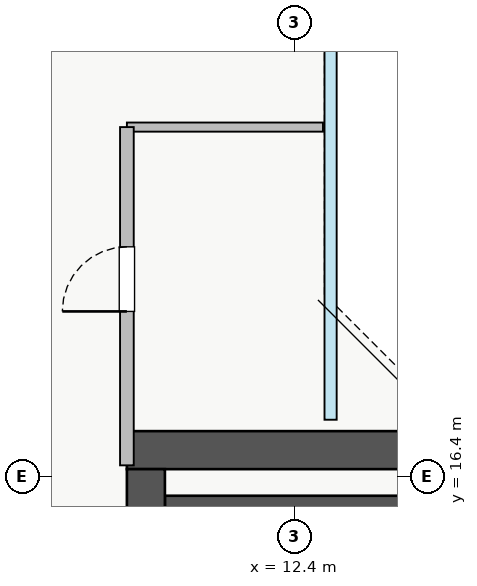
"""IFC4 building model, lengths in metres.
Left out: names, types, materials, properties, quantities, classifications, styles, units other than length and angle.
Written with IfcOpenShell. Run it as: python <this file> out.ifc"""

import sys

from ifc_helpers import new_model, si_unit, direction, frame, frame_2d, origin, place, context, subcontext, project, spatial, rectangle, extrude, source, transform, mapped, element, fill, save


model = new_model("IFC4")
c1 = context("Model", 3, precision=1e-05, world=origin(), true_north=direction((0.0, 1.0)))
c2 = subcontext(c1, "Body", "Model", "MODEL_VIEW")
j1 = project(units=[si_unit("LENGTHUNIT", "METRE"), si_unit("PLANEANGLEUNIT", "RADIAN")], contexts=[c1])
p1 = place(None, origin())
s1 = spatial("IfcSite", under=j1, at=p1, CompositionType="ELEMENT")
p2 = place(p1, origin())
s2 = spatial("IfcBuilding", under=s1, at=p2, CompositionType="ELEMENT")
p3 = place(p2, frame((0.0, 0.0, 210.0)))
s3 = spatial("IfcBuildingStorey", under=s2, at=p3, CompositionType="ELEMENT", Elevation=210.0)
p4 = place(p3, frame((10.7, 16.05, 0.0), z_axis=(0.0, 0.0, 1.0), x_axis=(1.0, 0.0, 0.0)))
e1 = element("IfcWall", 1, at=p4, inside=s3, PredefinedType="SHEAR", context=c2, shape_type="SweptSolid", body=[
    extrude(rectangle(XDim=7.45, YDim=0.2, at=frame_2d((3.725, 0.0))), origin(), (0.0, 0.0, 1.0), 3.25),
])
p5 = place(p3, frame((10.2, 16.75, 0.0), z_axis=(0.0, 0.0, 1.0), x_axis=(1.0, 0.0, 0.0)))
e2 = element("IfcWall", 2, at=p5, inside=s3, PredefinedType="SHEAR", context=c2, shape_type="SweptSolid", body=[
    extrude(rectangle(XDim=17.6, YDim=0.5, at=frame_2d((8.8, 0.0))), origin(), (0.0, 0.0, 1.0), 3.25),
])
p6 = place(p3, frame((10.45, 10.3, 0.0), z_axis=(0.0, 0.0, 1.0), x_axis=(0.0, 1.0, 0.0)))
e3 = element("IfcWall", 3, at=p6, inside=s3, PredefinedType="SHEAR", context=c2, shape_type="SweptSolid", body=[
    extrude(rectangle(XDim=6.2, YDim=0.5, at=frame_2d((3.1, 0.0))), origin(), (0.0, 0.0, 1.0), 3.25),
])
p7 = place(p3, frame((10.2, 21.0, 0.0), z_axis=(0.0, 0.0, 1.0), x_axis=(1.0, 0.0, 0.0)))
e4 = element("IfcWall", 4, at=p7, inside=s3, PredefinedType="PLUMBINGWALL", context=c2, shape_type="SweptSolid", body=[
    extrude(rectangle(XDim=2.58, YDim=0.12, at=frame_2d((1.29, 0.0))), origin(), (0.0, 0.0, 1.0), 3.07),
])
p8 = place(p3, frame((10.2, 16.55, 0.0), z_axis=(0.0, 0.0, 1.0), x_axis=(0.0, 1.0, 0.0)))
e5 = element("IfcWall", 5, at=p8, inside=s3, PredefinedType="PARTITIONING", context=c2, shape_type="SweptSolid", body=[
    extrude(rectangle(XDim=4.45, YDim=0.18, at=frame_2d((2.225, 0.0))), origin(), (0.0, 0.0, 1.0), 3.07),
])
p9 = place(p8, frame((2.025, 0.0, 0.0)))
e6 = element("IfcOpeningElement", 6, at=p9, cuts=e5, PredefinedType="OPENING", context=c2, shape_type="SweptSolid", body=[
    extrude(rectangle(XDim=0.85, YDim=2.05, at=frame_2d((0.425, 1.025))), frame((0.0, 0.1, 0.0), z_axis=(0.0, -1.0, 0.0), x_axis=(1.0, 0.0, 0.0)), (0.0, 0.0, 1.0), 0.2),
])
m1 = source(origin(), c2, "Body", "SweptSolid", [
    extrude(rectangle(XDim=0.85, YDim=2.05, at=frame_2d((0.425, 1.025))), frame((0.0, 0.025, 0.0), z_axis=(0.0, -1.0, 0.0), x_axis=(1.0, 0.0, 0.0)), (0.0, 0.0, 1.0), 0.05),
])
p10 = place(p9, origin())
e7 = element("IfcDoor", 7, at=p10, inside=s3, OperationType="SINGLE_SWING_LEFT", PredefinedType="DOOR", context=c2, shape_type="MappedRepresentation", body=[
    mapped(m1, transform((0.0, 0.0, 0.0), x_axis=(1.0, 0.0, 0.0), y_axis=(0.0, 1.0, 0.0), z_axis=(0.0, 0.0, 1.0), scale=1.0)),
])
fill(e6, e7)
save(model, sys.argv[1])
